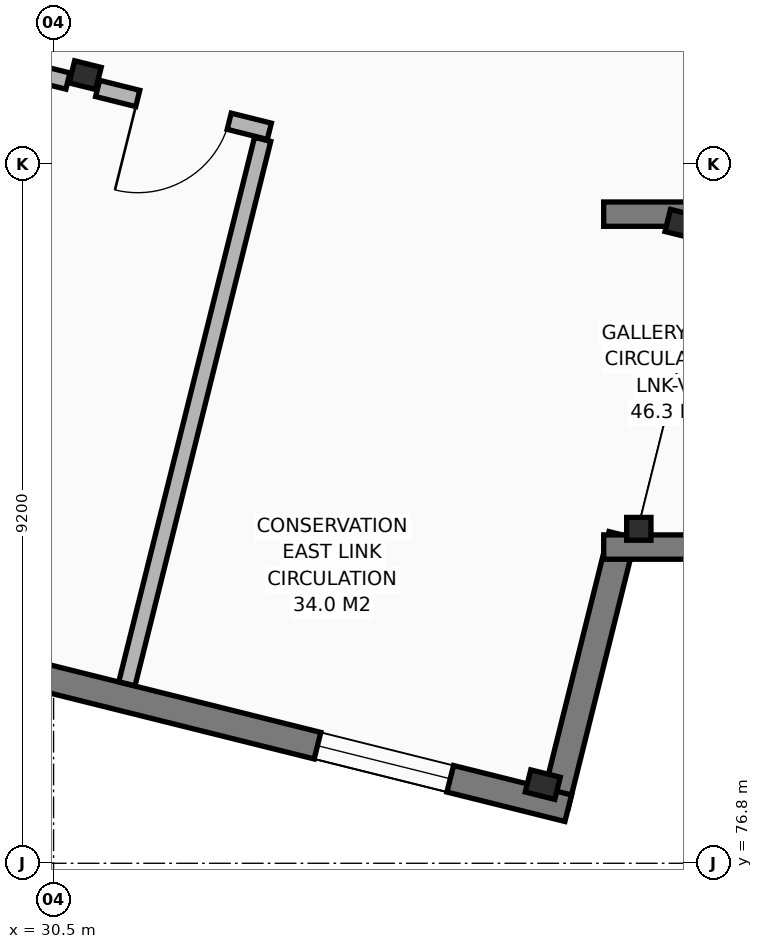
"""IFC4 building model, lengths in metres.
Left out: names, types, materials, properties, quantities, classifications, styles, units other than length and angle.
Written with IfcOpenShell. Run it as: python <this file> out.ifc"""

import sys

from ifc_helpers import new_model, si_unit, direction, frame, frame_2d, origin, origin_2d, place, context, subcontext, project, spatial, rectangle, i_section, extrude, element, fill, save


model = new_model("IFC4")
c1 = context("Model", 3, precision=1e-05, world=origin(), true_north=direction((0.0, 1.0)))
c2 = subcontext(c1, "Body", "Model", "MODEL_VIEW")
j1 = project(units=[si_unit("LENGTHUNIT", "METRE"), si_unit("PLANEANGLEUNIT", "RADIAN")], contexts=[c1])
p1 = place(None, origin())
s1 = spatial("IfcSite", under=j1, at=p1, CompositionType="ELEMENT")
p2 = place(p1, origin())
s2 = spatial("IfcBuilding", under=s1, at=p2, CompositionType="ELEMENT")
p3 = place(p2, frame((0.0, 0.0, 5.1)))
s3 = spatial("IfcBuildingStorey", under=s2, at=p3, CompositionType="ELEMENT", Elevation=5.1)
p4 = place(p3, frame((30.916, 87.169, 0.0), z_axis=(0.0, 0.0, 1.0), x_axis=(0.970295726276, -0.2419218956, 0.0)))
e1 = element("IfcColumn", 1, at=p4, inside=s3, PredefinedType="COLUMN", context=c2, shape_type="SweptSolid", body=[
    extrude(i_section(OverallWidth=0.3, OverallDepth=0.36, WebThickness=0.012, FlangeThickness=0.022, FilletRadius=0.027, at=origin_2d()), origin(), (0.0, 0.0, 1.0), 4.42),
])
for number, where, z_axis, x_axis in (
    (2, (36.936, 77.835, 0.0), (0.0, 0.0, 1.0), (0.97, -0.242, 0.0)),
    (3, (38.775, 85.209, 0.0), (0.0, 0.0, 1.0), (0.97, -0.242, 0.0)),
):
    element("IfcColumn", number, at=place(p3, frame(where, z_axis=z_axis, x_axis=x_axis)), inside=s3, PredefinedType="COLUMN", context=c2, shape_type="SweptSolid", body=[
        extrude(i_section(OverallWidth=0.3, OverallDepth=0.4, WebThickness=0.013, FlangeThickness=0.024, FilletRadius=0.027, at=origin_2d()), origin(), (0.0, 0.0, 1.0), 4.42),
    ])
p5 = place(p3, frame((38.2, 81.2, 0.0), z_axis=(0.0, 0.0, 1.0), x_axis=(1.0, 0.0, 0.0)))
e4 = element("IfcColumn", 4, at=p5, inside=s3, PredefinedType="COLUMN", context=c2, shape_type="SweptSolid", body=[
    extrude(i_section(OverallWidth=0.3, OverallDepth=0.32, WebThickness=0.011, FlangeThickness=0.021, FilletRadius=0.027, at=origin_2d()), origin(), (0.0, 0.0, 1.0), 4.42),
])
p6 = place(p3, frame((37.982, 81.12, 0.0), z_axis=(0.0, 0.0, 1.0), x_axis=(-0.241954977531, -0.970287477425, 0.0)))
e5 = element("IfcWall", 5, at=p6, inside=s3, PredefinedType="SOLIDWALL", context=c2, shape_type="SweptSolid", body=[
    extrude(rectangle(XDim=3.661, YDim=0.36, at=frame_2d((1.831, 0.0))), origin(), (0.0, 0.0, 1.0), 4.18),
])
p7 = place(p3, frame((37.271, 77.525, 0.0), z_axis=(0.0, 0.0, 1.0), x_axis=(-0.970297203556, 0.241915970475, 0.0)))
e6 = element("IfcWall", 6, at=p7, inside=s3, PredefinedType="SOLIDWALL", context=c2, shape_type="SweptSolid", body=[
    extrude(rectangle(XDim=32.82, YDim=0.36, at=frame_2d((16.41, 0.0))), origin(), (0.0, 0.0, 1.0), 4.18),
])
p8 = place(p7, frame((1.6, 0.0, 0.85)))
e7 = element("IfcOpeningElement", 7, at=p8, cuts=e6, PredefinedType="OPENING", context=c2, shape_type="SweptSolid", body=[
    extrude(rectangle(XDim=1.8, YDim=1.7, at=frame_2d((0.9, 0.85))), frame((0.0, 0.19, 0.0), z_axis=(0.0, -1.0, 0.0), x_axis=(1.0, 0.0, 0.0)), (0.0, 0.0, 1.0), 0.38),
])
p9 = place(p7, frame((13.448, 0.0, 0.85)))
e8 = element("IfcOpeningElement", 8, at=p9, cuts=e6, PredefinedType="OPENING", context=c2, shape_type="SweptSolid", body=[
    extrude(rectangle(XDim=1.95, YDim=1.5, at=frame_2d((0.975, 0.75))), frame((0.0, 0.19, 0.0), z_axis=(0.0, -1.0, 0.0), x_axis=(1.0, 0.0, 0.0)), (0.0, 0.0, 1.0), 0.38),
])
p10 = place(p7, frame((19.372, 0.0, 0.85)))
e9 = element("IfcOpeningElement", 9, at=p10, cuts=e6, PredefinedType="OPENING", context=c2, shape_type="SweptSolid", body=[
    extrude(rectangle(XDim=1.5, YDim=1.7, at=frame_2d((0.75, 0.85))), frame((0.0, 0.19, 0.0), z_axis=(0.0, -1.0, 0.0), x_axis=(1.0, 0.0, 0.0)), (0.0, 0.0, 1.0), 0.38),
])
p11 = place(p7, frame((25.296, 0.0, 0.85)))
e10 = element("IfcOpeningElement", 10, at=p11, cuts=e6, PredefinedType="OPENING", context=c2, shape_type="SweptSolid", body=[
    extrude(rectangle(XDim=1.8, YDim=1.7, at=frame_2d((0.9, 0.85))), frame((0.0, 0.19, 0.0), z_axis=(0.0, -1.0, 0.0), x_axis=(1.0, 0.0, 0.0)), (0.0, 0.0, 1.0), 0.38),
])
p12 = place(p3, frame((49.05, 80.96, 0.0), z_axis=(0.0, 0.0, 1.0), x_axis=(-1.0, 0.0, 0.0)))
e11 = element("IfcWall", 11, at=p12, inside=s3, PredefinedType="SOLIDWALL", context=c2, shape_type="SweptSolid", body=[
    extrude(rectangle(XDim=11.312, YDim=0.32, at=frame_2d((5.656, 0.0))), origin(), (0.0, 0.0, 1.0), 4.17),
])
p13 = place(p12, frame((4.681, 0.0, 1.12)))
e12 = element("IfcOpeningElement", 12, at=p13, cuts=e11, PredefinedType="OPENING", context=c2, shape_type="SweptSolid", body=[
    extrude(rectangle(XDim=1.95, YDim=1.5, at=frame_2d((0.975, 0.75))), frame((0.0, 0.17, 0.0), z_axis=(0.0, -1.0, 0.0), x_axis=(1.0, 0.0, 0.0)), (0.0, 0.0, 1.0), 0.34),
])
p14 = place(p3, frame((37.738, 85.34, 0.0), z_axis=(0.0, 0.0, 1.0), x_axis=(1.0, 0.0, 0.0)))
e13 = element("IfcWall", 13, at=p14, inside=s3, PredefinedType="SOLIDWALL", context=c2, shape_type="SweptSolid", body=[
    extrude(rectangle(XDim=11.312, YDim=0.32, at=frame_2d((5.656, 0.0))), origin(), (0.0, 0.0, 1.0), 4.17),
])
p15 = place(p14, frame((4.681, 0.0, 1.12)))
e14 = element("IfcOpeningElement", 14, at=p15, cuts=e13, PredefinedType="OPENING", context=c2, shape_type="SweptSolid", body=[
    extrude(rectangle(XDim=1.95, YDim=1.5, at=frame_2d((0.975, 0.75))), frame((0.0, 0.17, 0.0), z_axis=(0.0, -1.0, 0.0), x_axis=(1.0, 0.0, 0.0)), (0.0, 0.0, 1.0), 0.34),
])
p16 = place(p3, frame((30.689, 87.091, 0.0), z_axis=(0.0, 0.0, 1.0), x_axis=(-0.970295427473, 0.241923094029, 0.0)))
e15 = element("IfcWall", 15, at=p16, inside=s3, PredefinedType="PARTITIONING", context=c2, shape_type="SweptSolid", body=[
    extrude(rectangle(XDim=7.597, YDim=0.22, at=frame_2d((3.798, 0.0))), origin(), (0.0, 0.0, 1.0), 3.67),
])
p17 = place(p3, frame((33.339, 86.43, 0.0), z_axis=(0.0, 0.0, 1.0), x_axis=(-0.970308784597, 0.241869515512, 0.0)))
e16 = element("IfcWall", 16, at=p17, inside=s3, PredefinedType="PARTITIONING", context=c2, shape_type="SweptSolid", body=[
    extrude(rectangle(XDim=2.329, YDim=0.22, at=frame_2d((1.164, 0.0))), origin(), (0.0, 0.0, 1.0), 3.67),
])
p18 = place(p17, frame((0.544, 0.0, 0.0)))
e17 = element("IfcOpeningElement", 17, at=p18, cuts=e16, PredefinedType="OPENING", context=c2, shape_type="SweptSolid", body=[
    extrude(rectangle(XDim=1.24, YDim=2.15, at=frame_2d((0.62, 1.075))), frame((0.0, 0.12, 0.0), z_axis=(0.0, -1.0, 0.0), x_axis=(1.0, 0.0, 0.0)), (0.0, 0.0, 1.0), 0.24),
])
p19 = place(p3, frame((31.465, 79.162, 0.0), z_axis=(0.0, 0.0, 1.0), x_axis=(0.241897367133, 0.97030184158, 0.0)))
e18 = element("IfcWall", 18, at=p19, inside=s3, PredefinedType="PARTITIONING", context=c2, shape_type="SweptSolid", body=[
    extrude(rectangle(XDim=7.381, YDim=0.22, at=frame_2d((3.69, 0.0))), origin(), (0.0, 0.0, 1.0), 3.67),
])
p20 = place(p8, origin())
e19 = element("IfcWindow", 19, at=p20, inside=s3, PartitioningType="SINGLE_PANEL", PredefinedType="WINDOW", context=c2, shape_type="SweptSolid", body=[
    extrude(rectangle(XDim=1.8, YDim=1.7, at=frame_2d((0.9, 0.85))), frame((0.0, 0.03, 0.0), z_axis=(0.0, -1.0, 0.0), x_axis=(1.0, 0.0, 0.0)), (0.0, 0.0, 1.0), 0.06),
])
fill(e7, e19)
p21 = place(p18, origin())
e20 = element("IfcDoor", 20, at=p21, inside=s3, OperationType="SINGLE_SWING_RIGHT", PredefinedType="DOOR", context=c2, shape_type="SweptSolid", body=[
    extrude(rectangle(XDim=1.24, YDim=2.15, at=frame_2d((0.62, 1.075))), frame((0.0, 0.025, 0.0), z_axis=(0.0, -1.0, 0.0), x_axis=(1.0, 0.0, 0.0)), (0.0, 0.0, 1.0), 0.05),
])
fill(e17, e20)
save(model, sys.argv[1])
